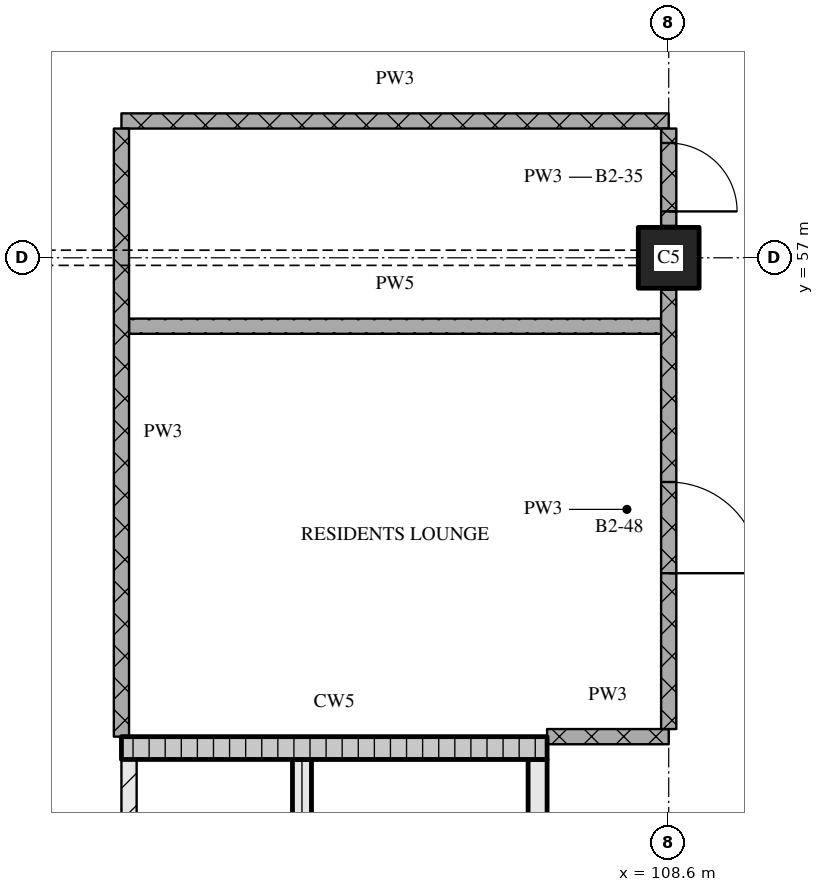
"""IFC4 building model, lengths in metres.
Left out: names, types, materials, properties, quantities, classifications, styles, units other than length and angle.
Written with IfcOpenShell. Run it as: python <this file> out.ifc"""

import sys

from ifc_helpers import new_model, si_unit, direction, frame, frame_2d, origin, origin_2d, place, context, subcontext, project, spatial, rectangle, extrude, element, fill, save


model = new_model("IFC4")
c1 = context("Model", 3, precision=1e-05, world=origin(), true_north=direction((0.0, 1.0)))
c2 = subcontext(c1, "Body", "Model", "MODEL_VIEW")
j1 = project(units=[si_unit("LENGTHUNIT", "METRE"), si_unit("PLANEANGLEUNIT", "RADIAN")], contexts=[c1])
p1 = place(None, origin())
s1 = spatial("IfcSite", under=j1, at=p1, CompositionType="ELEMENT")
p2 = place(p1, origin())
s2 = spatial("IfcBuilding", under=s1, at=p2, CompositionType="ELEMENT")
p3 = place(p2, frame((0.0, 0.0, 113.25)))
s3 = spatial("IfcBuildingStorey", under=s2, at=p3, CompositionType="ELEMENT", Elevation=113.25)
p4 = place(p3, frame((108.6, 57.0, 0.0), z_axis=(0.0, 0.0, 1.0), x_axis=(1.0, 0.0, 0.0)))
e1 = element("IfcColumn", 1, at=p4, inside=s3, PredefinedType="COLUMN", context=c2, shape_type="SweptSolid", body=[
    extrude(rectangle(XDim=0.8, YDim=0.8, at=origin_2d()), origin(), (0.0, 0.0, 1.0), 3.6),
])
p5 = place(p3, frame((101.5, 43.5, 0.0), z_axis=(0.0, 0.0, 1.0), x_axis=(0.0, 1.0, 0.0)))
e2 = element("IfcWall", 2, at=p5, inside=s3, PredefinedType="PARTITIONING", context=c2, shape_type="SweptSolid", body=[
    extrude(rectangle(XDim=6.9, YDim=0.2, at=frame_2d((3.45, 0.0))), origin(), (0.0, 0.0, 1.0), 3.32),
])
p6 = place(p5, frame((1.0, 0.0, 0.0)))
e3 = element("IfcOpeningElement", 3, at=p6, cuts=e2, PredefinedType="OPENING", context=c2, shape_type="SweptSolid", body=[
    extrude(rectangle(XDim=1.0, YDim=2.1, at=frame_2d((0.5, 1.05))), frame((0.0, 0.11, 0.0), z_axis=(0.0, -1.0, 0.0), x_axis=(1.0, 0.0, 0.0)), (0.0, 0.0, 1.0), 0.22),
])
p7 = place(p3, frame((103.775, 43.5, 0.0), z_axis=(0.0, 0.0, 1.0), x_axis=(0.0, 1.0, 0.0)))
e4 = element("IfcWall", 4, at=p7, inside=s3, PredefinedType="SOLIDWALL", context=c2, shape_type="SweptSolid", body=[
    extrude(rectangle(XDim=6.9, YDim=0.25, at=frame_2d((3.45, 0.0))), origin(), (0.0, 0.0, 1.0), 3.32),
])
p8 = place(p7, frame((0.2, 0.0, 0.0)))
e5 = element("IfcOpeningElement", 5, at=p8, cuts=e4, PredefinedType="OPENING", context=c2, shape_type="SweptSolid", body=[
    extrude(rectangle(XDim=1.0, YDim=2.1, at=frame_2d((0.5, 1.05))), frame((0.0, 0.135, 0.0), z_axis=(0.0, -1.0, 0.0), x_axis=(1.0, 0.0, 0.0)), (0.0, 0.0, 1.0), 0.27),
])
p9 = place(p3, frame((106.875, 43.5, 0.0), z_axis=(0.0, 0.0, 1.0), x_axis=(0.0, 1.0, 0.0)))
e6 = element("IfcWall", 6, at=p9, inside=s3, PredefinedType="SOLIDWALL", context=c2, shape_type="SweptSolid", body=[
    extrude(rectangle(XDim=6.9, YDim=0.25, at=frame_2d((3.45, 0.0))), origin(), (0.0, 0.0, 1.0), 3.32),
])
p10 = place(p3, frame((101.4, 50.55, 0.0), z_axis=(0.0, 0.0, 1.0), x_axis=(1.0, 0.0, 0.0)))
e7 = element("IfcWall", 7, at=p10, inside=s3, PredefinedType="SOLIDWALL", context=c2, shape_type="SweptSolid", body=[
    extrude(rectangle(XDim=5.6, YDim=0.3, at=frame_2d((2.8, 0.0))), origin(), (0.0, 0.0, 1.0), 3.32),
])
p11 = place(p3, frame((107.0, 50.7, 0.0), z_axis=(0.0, 0.0, 1.0), x_axis=(1.0, 0.0, 0.0)))
e8 = element("IfcWall", 8, at=p11, inside=s3, PredefinedType="PARTITIONING", context=c2, shape_type="SweptSolid", body=[
    extrude(rectangle(XDim=1.6, YDim=0.2, at=frame_2d((0.8, 0.0))), origin(), (0.0, 0.0, 1.0), 3.32),
])
p12 = place(p3, frame((101.5, 56.1, 0.0), z_axis=(0.0, 0.0, 1.0), x_axis=(1.0, 0.0, 0.0)))
e9 = element("IfcWall", 9, at=p12, inside=s3, PredefinedType="PARTITIONING", context=c2, shape_type="SweptSolid", body=[
    extrude(rectangle(XDim=7.0, YDim=0.2, at=frame_2d((3.5, 0.0))), origin(), (0.0, 0.0, 1.0), 3.32),
])
p13 = place(p3, frame((101.4, 58.8, 0.0), z_axis=(0.0, 0.0, 1.0), x_axis=(1.0, 0.0, 0.0)))
e10 = element("IfcWall", 10, at=p13, inside=s3, PredefinedType="PARTITIONING", context=c2, shape_type="SweptSolid", body=[
    extrude(rectangle(XDim=7.2, YDim=0.2, at=frame_2d((3.6, 0.0))), origin(), (0.0, 0.0, 1.0), 3.32),
])
p14 = place(p3, frame((101.4, 58.7, 0.0), z_axis=(0.0, 0.0, 1.0), x_axis=(0.0, -1.0, 0.0)))
e11 = element("IfcWall", 11, at=p14, inside=s3, PredefinedType="PARTITIONING", context=c2, shape_type="SweptSolid", body=[
    extrude(rectangle(XDim=8.0, YDim=0.2, at=frame_2d((4.0, 0.0))), origin(), (0.0, 0.0, 1.0), 3.32),
])
p15 = place(p3, frame((108.6, 50.8, 0.0), z_axis=(0.0, 0.0, 1.0), x_axis=(0.0, 1.0, 0.0)))
e12 = element("IfcWall", 12, at=p15, inside=s3, PredefinedType="PARTITIONING", context=c2, shape_type="SweptSolid", body=[
    extrude(rectangle(XDim=5.78, YDim=0.2, at=frame_2d((2.89, 0.0))), origin(), (0.0, 0.0, 1.0), 3.32),
])
p16 = place(p15, frame((2.05, 0.0, 0.0)))
e13 = element("IfcOpeningElement", 13, at=p16, cuts=e12, PredefinedType="OPENING", context=c2, shape_type="SweptSolid", body=[
    extrude(rectangle(XDim=1.2, YDim=2.1, at=frame_2d((0.6, 1.05))), frame((0.0, 0.11, 0.0), z_axis=(0.0, -1.0, 0.0), x_axis=(1.0, 0.0, 0.0)), (0.0, 0.0, 1.0), 0.22),
])
p17 = place(p3, frame((108.6, 57.42, 0.0), z_axis=(0.0, 0.0, 1.0), x_axis=(0.0, 1.0, 0.0)))
e14 = element("IfcWall", 14, at=p17, inside=s3, PredefinedType="PARTITIONING", context=c2, shape_type="SweptSolid", body=[
    extrude(rectangle(XDim=1.28, YDim=0.2, at=frame_2d((0.64, 0.0))), origin(), (0.0, 0.0, 1.0), 3.32),
])
p18 = place(p17, frame((0.19, 0.0, 0.0)))
e15 = element("IfcOpeningElement", 15, at=p18, cuts=e14, PredefinedType="OPENING", context=c2, shape_type="SweptSolid", body=[
    extrude(rectangle(XDim=0.9, YDim=2.1, at=frame_2d((0.45, 1.05))), frame((0.0, 0.11, 0.0), z_axis=(0.0, -1.0, 0.0), x_axis=(1.0, 0.0, 0.0)), (0.0, 0.0, 1.0), 0.22),
])
p19 = place(p16, origin())
e16 = element("IfcDoor", 16, at=p19, inside=s3, OperationType="SINGLE_SWING_RIGHT", PredefinedType="DOOR", context=c2, shape_type="SweptSolid", body=[
    extrude(rectangle(XDim=1.2, YDim=2.1, at=frame_2d((0.6, 1.05))), frame((0.0, 0.025, 0.0), z_axis=(0.0, -1.0, 0.0), x_axis=(1.0, 0.0, 0.0)), (0.0, 0.0, 1.0), 0.05),
])
fill(e13, e16)
p20 = place(p18, origin())
e17 = element("IfcDoor", 17, at=p20, inside=s3, OperationType="SINGLE_SWING_RIGHT", PredefinedType="DOOR", context=c2, shape_type="SweptSolid", body=[
    extrude(rectangle(XDim=0.9, YDim=2.1, at=frame_2d((0.45, 1.05))), frame((0.0, 0.025, 0.0), z_axis=(0.0, -1.0, 0.0), x_axis=(1.0, 0.0, 0.0)), (0.0, 0.0, 1.0), 0.05),
])
fill(e15, e17)
save(model, sys.argv[1])
